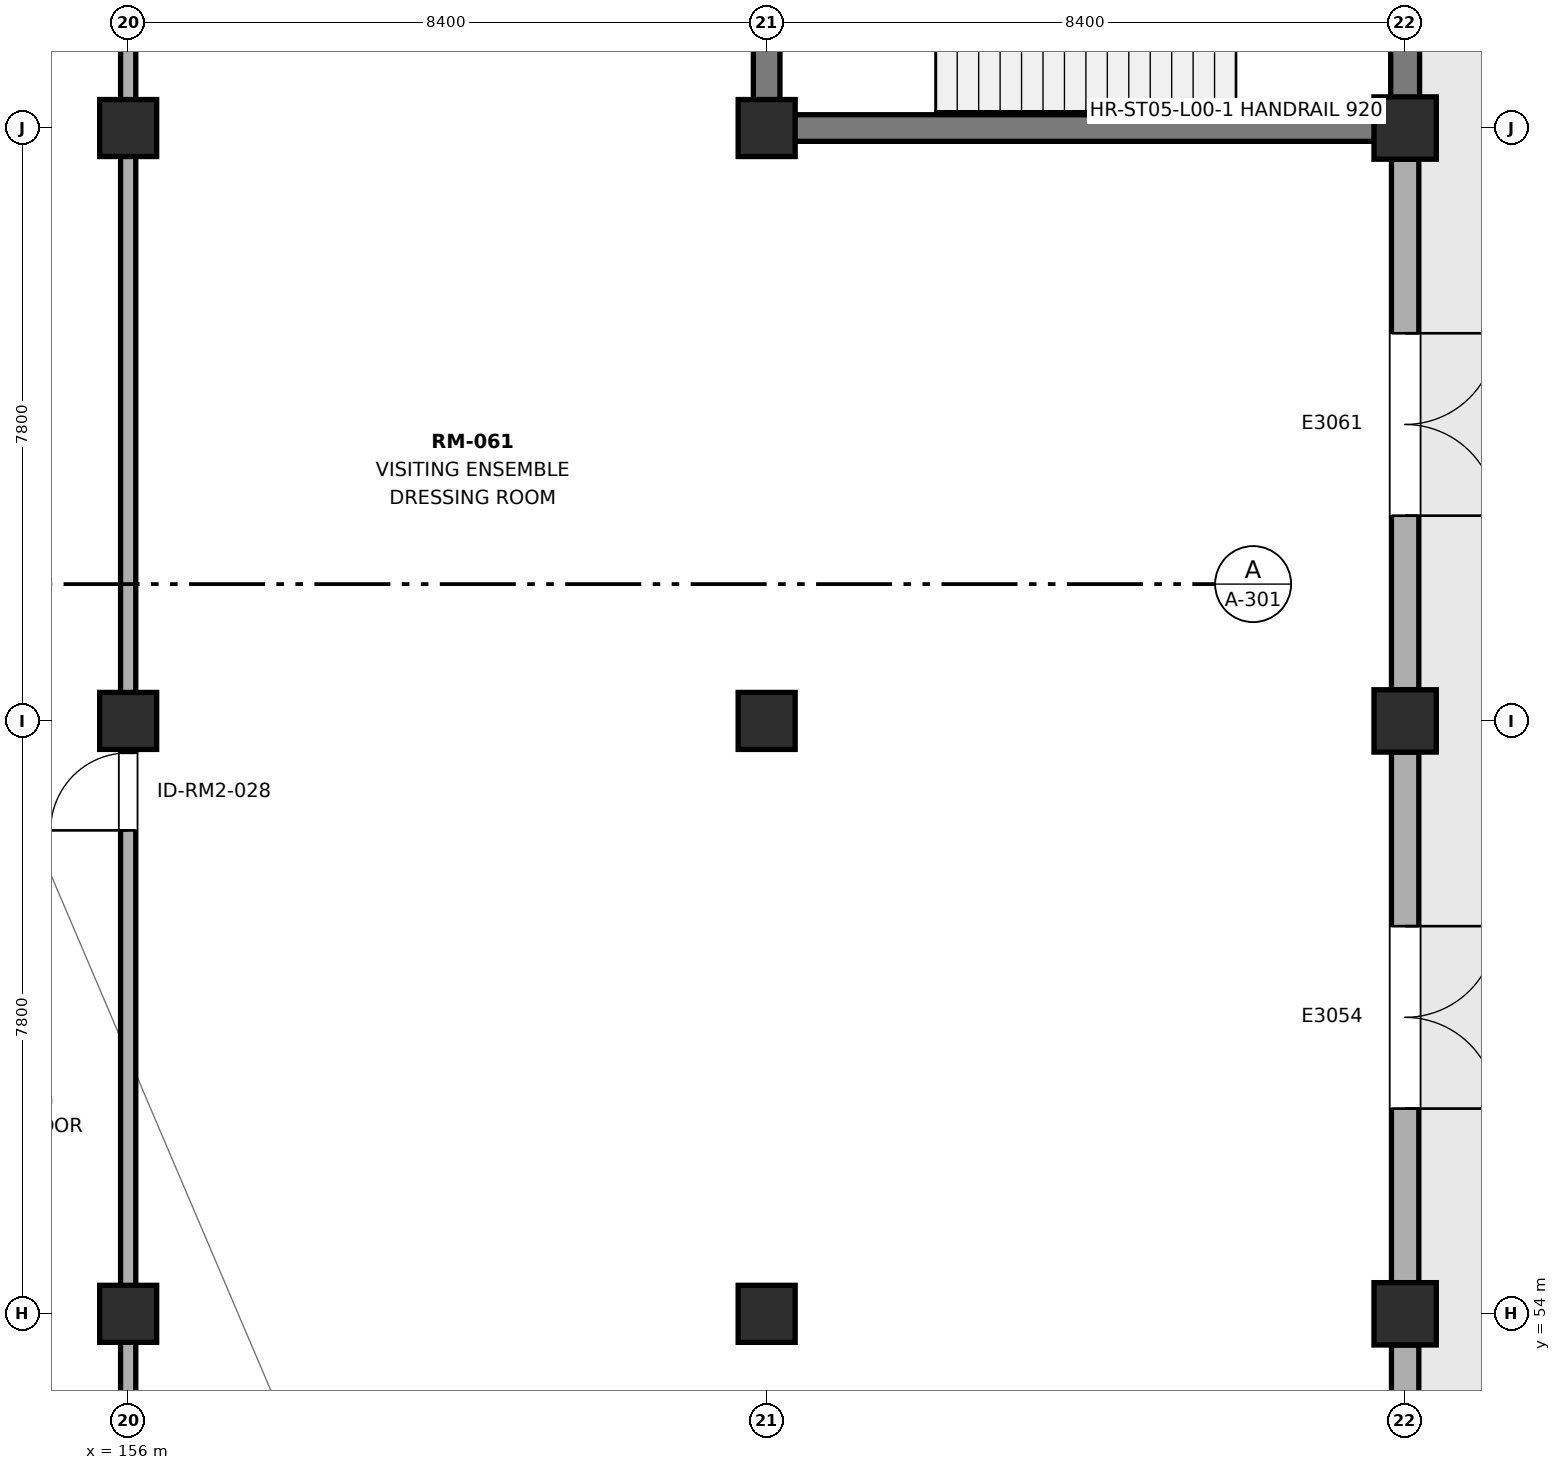
"""IFC4 building model, lengths in metres.
Left out: names, types, materials, properties, quantities, classifications, styles, units other than length and angle.
Written with IfcOpenShell. Run it as: python <this file> out.ifc"""

import sys

from ifc_helpers import new_model, si_unit, direction, frame, frame_2d, origin, origin_2d, place, context, subcontext, project, spatial, rectangle, extrude, element, fill, save


model = new_model("IFC4")
c1 = context("Model", 3, precision=1e-05, world=origin(), true_north=direction((0.0, 1.0)))
c2 = subcontext(c1, "Body", "Model", "MODEL_VIEW")
j1 = project(units=[si_unit("LENGTHUNIT", "METRE"), si_unit("PLANEANGLEUNIT", "RADIAN")], contexts=[c1])
p1 = place(None, origin())
s1 = spatial("IfcSite", under=j1, at=p1, CompositionType="ELEMENT")
p2 = place(p1, origin())
s2 = spatial("IfcBuilding", under=s1, at=p2, CompositionType="ELEMENT")
p3 = place(p2, origin())
s3 = spatial("IfcBuildingStorey", under=s2, at=p3, CompositionType="ELEMENT", Elevation=0.0)
for number, where, z_axis, x_axis in (
    (1, (156.0, 54.0, 0.0), (0.0, 0.0, 1.0), (1.0, 0.0, 0.0)),
    (2, (156.0, 61.8, 0.0), (0.0, 0.0, 1.0), (1.0, 0.0, 0.0)),
    (3, (156.0, 69.6, 0.0), (0.0, 0.0, 1.0), (1.0, 0.0, 0.0)),
    (4, (164.4, 54.0, 0.0), (0.0, 0.0, 1.0), (1.0, 0.0, 0.0)),
    (5, (164.4, 61.8, 0.0), (0.0, 0.0, 1.0), (1.0, 0.0, 0.0)),
    (6, (164.4, 69.6, 0.0), (0.0, 0.0, 1.0), (1.0, 0.0, 0.0)),
):
    element("IfcColumn", number, at=place(p3, frame(where, z_axis=z_axis, x_axis=x_axis)), inside=s3, PredefinedType="COLUMN", context=c2, shape_type="SweptSolid", body=[
        extrude(rectangle(XDim=0.75, YDim=0.75, at=origin_2d()), origin(), (0.0, 0.0, 1.0), 5.4),
    ])
for number, where, z_axis, x_axis in (
    (7, (172.8, 54.0, 0.0), (0.0, 0.0, 1.0), (1.0, 0.0, 0.0)),
    (8, (172.8, 61.8, 0.0), (0.0, 0.0, 1.0), (1.0, 0.0, 0.0)),
    (9, (172.8, 69.6, 0.0), (0.0, 0.0, 1.0), (1.0, 0.0, 0.0)),
):
    element("IfcColumn", number, at=place(p3, frame(where, z_axis=z_axis, x_axis=x_axis)), inside=s3, PredefinedType="COLUMN", context=c2, shape_type="SweptSolid", body=[
        extrude(rectangle(XDim=0.82, YDim=0.82, at=origin_2d()), origin(), (0.0, 0.0, 1.0), 5.4),
    ])
p4 = place(p3, frame((164.225, 69.6, 0.0), z_axis=(0.0, 0.0, 1.0), x_axis=(1.0, 0.0, 0.0)))
e10 = element("IfcWall", 10, at=p4, inside=s3, PredefinedType="SHEAR", context=c2, shape_type="SweptSolid", body=[
    extrude(rectangle(XDim=8.75, YDim=0.35, at=frame_2d((4.375, 0.0))), origin(), (0.0, 0.0, 1.0), 5.4),
])
p5 = place(p3, frame((164.4, 69.775, 0.0), z_axis=(0.0, 0.0, 1.0), x_axis=(0.0, 1.0, 0.0)))
e11 = element("IfcWall", 11, at=p5, inside=s3, PredefinedType="SHEAR", context=c2, shape_type="SweptSolid", body=[
    extrude(rectangle(XDim=7.45, YDim=0.35, at=frame_2d((3.725, 0.0))), origin(), (0.0, 0.0, 1.0), 5.4),
])
p6 = place(p5, frame((2.1, 0.0, 0.0)))
e12 = element("IfcOpeningElement", 12, at=p6, cuts=e11, PredefinedType="OPENING", context=c2, shape_type="SweptSolid", body=[
    extrude(rectangle(XDim=1.1, YDim=2.2, at=frame_2d((0.55, 1.1))), frame((0.0, 0.185, 0.0), z_axis=(0.0, -1.0, 0.0), x_axis=(1.0, 0.0, 0.0)), (0.0, 0.0, 1.0), 0.37),
])
p7 = place(p3, frame((172.8, 69.775, 0.0), z_axis=(0.0, 0.0, 1.0), x_axis=(0.0, 1.0, 0.0)))
e13 = element("IfcWall", 13, at=p7, inside=s3, PredefinedType="SHEAR", context=c2, shape_type="SweptSolid", body=[
    extrude(rectangle(XDim=7.45, YDim=0.38, at=frame_2d((3.725, 0.0))), origin(), (0.0, 0.0, 1.0), 5.4),
])
p8 = place(p7, frame((5.8, 0.0, 0.0)))
e14 = element("IfcOpeningElement", 14, at=p8, cuts=e13, PredefinedType="OPENING", context=c2, shape_type="SweptSolid", body=[
    extrude(rectangle(XDim=1.2, YDim=2.3, at=frame_2d((0.6, 1.15))), frame((0.0, 0.2, 0.0), z_axis=(0.0, -1.0, 0.0), x_axis=(1.0, 0.0, 0.0)), (0.0, 0.0, 1.0), 0.4),
])
p9 = place(p3, frame((172.8, 46.61, 0.0), z_axis=(0.0, 0.0, 1.0), x_axis=(0.0, 1.0, 0.0)))
e15 = element("IfcWall", 15, at=p9, inside=s3, PredefinedType="SOLIDWALL", context=c2, shape_type="SweptSolid", body=[
    extrude(rectangle(XDim=6.98, YDim=0.36, at=frame_2d((3.49, 0.0))), origin(), (0.0, 0.0, 1.0), 4.4),
])
p10 = place(p9, frame((2.29, 0.0, 0.0)))
e16 = element("IfcOpeningElement", 16, at=p10, cuts=e15, PredefinedType="OPENING", context=c2, shape_type="SweptSolid", body=[
    extrude(rectangle(XDim=2.4, YDim=2.6, at=frame_2d((1.2, 1.3))), frame((0.0, 0.19, 0.0), z_axis=(0.0, -1.0, 0.0), x_axis=(1.0, 0.0, 0.0)), (0.0, 0.0, 1.0), 0.38),
])
p11 = place(p3, frame((172.8, 54.41, 0.0), z_axis=(0.0, 0.0, 1.0), x_axis=(0.0, 1.0, 0.0)))
e17 = element("IfcWall", 17, at=p11, inside=s3, PredefinedType="SOLIDWALL", context=c2, shape_type="SweptSolid", body=[
    extrude(rectangle(XDim=6.98, YDim=0.36, at=frame_2d((3.49, 0.0))), origin(), (0.0, 0.0, 1.0), 4.4),
])
p12 = place(p11, frame((2.29, 0.0, 0.0)))
e18 = element("IfcOpeningElement", 18, at=p12, cuts=e17, PredefinedType="OPENING", context=c2, shape_type="SweptSolid", body=[
    extrude(rectangle(XDim=2.4, YDim=2.6, at=frame_2d((1.2, 1.3))), frame((0.0, 0.19, 0.0), z_axis=(0.0, -1.0, 0.0), x_axis=(1.0, 0.0, 0.0)), (0.0, 0.0, 1.0), 0.38),
])
p13 = place(p3, frame((172.8, 62.21, 0.0), z_axis=(0.0, 0.0, 1.0), x_axis=(0.0, 1.0, 0.0)))
e19 = element("IfcWall", 19, at=p13, inside=s3, PredefinedType="SOLIDWALL", context=c2, shape_type="SweptSolid", body=[
    extrude(rectangle(XDim=6.98, YDim=0.36, at=frame_2d((3.49, 0.0))), origin(), (0.0, 0.0, 1.0), 4.4),
])
p14 = place(p13, frame((2.29, 0.0, 0.0)))
e20 = element("IfcOpeningElement", 20, at=p14, cuts=e19, PredefinedType="OPENING", context=c2, shape_type="SweptSolid", body=[
    extrude(rectangle(XDim=2.4, YDim=2.6, at=frame_2d((1.2, 1.3))), frame((0.0, 0.19, 0.0), z_axis=(0.0, -1.0, 0.0), x_axis=(1.0, 0.0, 0.0)), (0.0, 0.0, 1.0), 0.38),
])
p15 = place(p3, frame((156.0, 30.36, 0.0), z_axis=(0.0, 0.0, 1.0), x_axis=(0.0, 1.0, 0.0)))
e21 = element("IfcWall", 21, at=p15, inside=s3, PredefinedType="PARTITIONING", context=c2, shape_type="SweptSolid", body=[
    extrude(rectangle(XDim=68.86, YDim=0.2, at=frame_2d((34.43, 0.0))), origin(), (0.0, 0.0, 1.0), 4.3),
])
p16 = place(p15, frame((12.0, 0.0, 0.0)))
e22 = element("IfcOpeningElement", 22, at=p16, cuts=e21, PredefinedType="OPENING", context=c2, shape_type="SweptSolid", body=[
    extrude(rectangle(XDim=1.05, YDim=2.25, at=frame_2d((0.525, 1.125))), frame((0.0, 0.11, 0.0), z_axis=(0.0, -1.0, 0.0), x_axis=(1.0, 0.0, 0.0)), (0.0, 0.0, 1.0), 0.22),
])
p17 = place(p15, frame((30.0, 0.0, 0.0)))
e23 = element("IfcOpeningElement", 23, at=p17, cuts=e21, PredefinedType="OPENING", context=c2, shape_type="SweptSolid", body=[
    extrude(rectangle(XDim=1.02, YDim=2.18, at=frame_2d((0.51, 1.09))), frame((0.0, 0.11, 0.0), z_axis=(0.0, -1.0, 0.0), x_axis=(1.0, 0.0, 0.0)), (0.0, 0.0, 1.0), 0.22),
])
p18 = place(p15, frame((65.8, 0.0, 0.0)))
e24 = element("IfcOpeningElement", 24, at=p18, cuts=e21, PredefinedType="OPENING", context=c2, shape_type="SweptSolid", body=[
    extrude(rectangle(XDim=0.92, YDim=2.15, at=frame_2d((0.46, 1.075))), frame((0.0, 0.11, 0.0), z_axis=(0.0, -1.0, 0.0), x_axis=(1.0, 0.0, 0.0)), (0.0, 0.0, 1.0), 0.22),
])
p19 = place(p12, frame((2.4, 0.0, 0.0), z_axis=(0.0, 0.0, 1.0), x_axis=(-1.0, 0.0, 0.0)))
e25 = element("IfcDoor", 25, at=p19, inside=s3, OperationType="DOUBLE_DOOR_SINGLE_SWING", PredefinedType="DOOR", context=c2, shape_type="SweptSolid", body=[
    extrude(rectangle(XDim=2.4, YDim=2.6, at=frame_2d((1.2, 1.3))), frame((0.0, 0.025, 0.0), z_axis=(0.0, -1.0, 0.0), x_axis=(1.0, 0.0, 0.0)), (0.0, 0.0, 1.0), 0.05),
])
fill(e18, e25)
p20 = place(p14, frame((2.4, 0.0, 0.0), z_axis=(0.0, 0.0, 1.0), x_axis=(-1.0, 0.0, 0.0)))
e26 = element("IfcDoor", 26, at=p20, inside=s3, OperationType="DOUBLE_DOOR_SINGLE_SWING", PredefinedType="DOOR", context=c2, shape_type="SweptSolid", body=[
    extrude(rectangle(XDim=2.4, YDim=2.6, at=frame_2d((1.2, 1.3))), frame((0.0, 0.025, 0.0), z_axis=(0.0, -1.0, 0.0), x_axis=(1.0, 0.0, 0.0)), (0.0, 0.0, 1.0), 0.05),
])
fill(e20, e26)
p21 = place(p17, origin())
e27 = element("IfcDoor", 27, at=p21, inside=s3, OperationType="SINGLE_SWING_LEFT", PredefinedType="DOOR", context=c2, shape_type="SweptSolid", body=[
    extrude(rectangle(XDim=1.02, YDim=2.18, at=frame_2d((0.51, 1.09))), frame((0.0, 0.025, 0.0), z_axis=(0.0, -1.0, 0.0), x_axis=(1.0, 0.0, 0.0)), (0.0, 0.0, 1.0), 0.05),
])
fill(e23, e27)
save(model, sys.argv[1])
